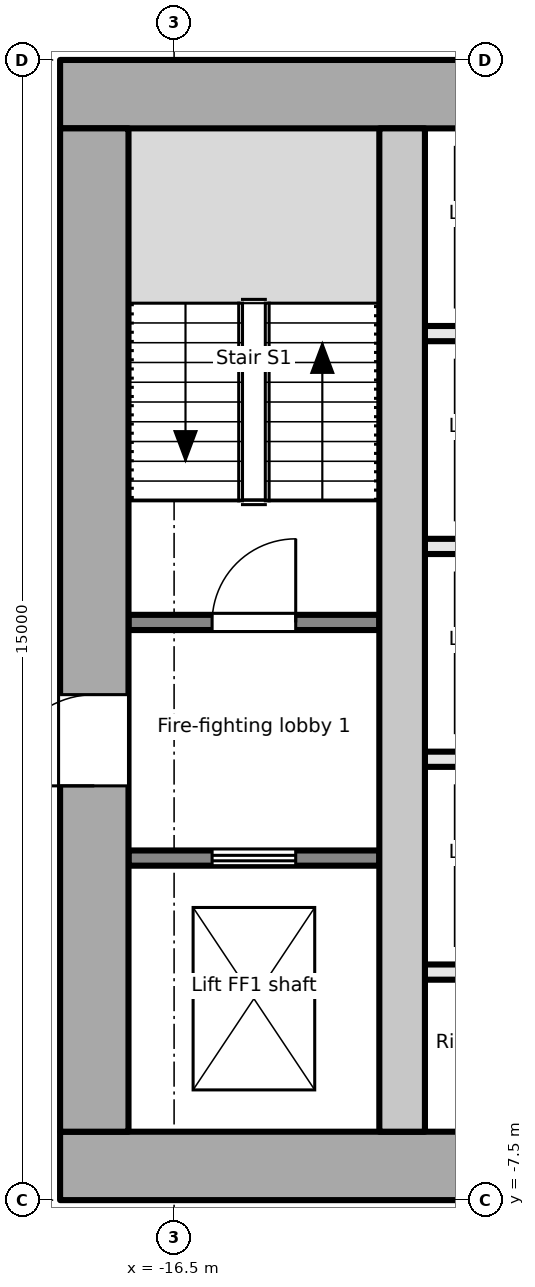
"""IFC4 building model, lengths in metres.
Left out: names, types, materials, properties, quantities, classifications, styles, units other than length and angle.
Written with IfcOpenShell. Run it as: python <this file> out.ifc"""

import sys

from ifc_helpers import new_model, si_unit, direction, frame, frame_2d, origin, place, context, subcontext, project, spatial, rectangle, extrude, element, fill, save


model = new_model("IFC4")
c1 = context("Model", 3, precision=1e-05, world=origin(), true_north=direction((0.0, 1.0)))
c2 = subcontext(c1, "Body", "Model", "MODEL_VIEW")
j1 = project(units=[si_unit("LENGTHUNIT", "METRE"), si_unit("PLANEANGLEUNIT", "RADIAN")], contexts=[c1])
p1 = place(None, origin())
s1 = spatial("IfcSite", under=j1, at=p1, CompositionType="ELEMENT")
p2 = place(p1, origin())
s2 = spatial("IfcBuilding", under=s1, at=p2, CompositionType="ELEMENT")
p3 = place(p2, frame((0.0, 0.0, 52.9)))
s3 = spatial("IfcBuildingStorey", under=s2, at=p3, CompositionType="ELEMENT", Elevation=52.9)
p4 = place(p3, frame((-18.0, -7.05, -0.2), z_axis=(0.0, 0.0, 1.0), x_axis=(1.0, 0.0, 0.0)))
e1 = element("IfcWall", 1, at=p4, inside=s3, PredefinedType="SHEAR", context=c2, shape_type="SweptSolid", body=[
    extrude(rectangle(XDim=36.0, YDim=0.9, at=frame_2d((18.0, 0.0))), origin(), (0.0, 0.0, 1.0), 4.1),
])
p5 = place(p4, frame((7.8, 0.0, 0.2)))
e2 = element("IfcOpeningElement", 2, at=p5, cuts=e1, PredefinedType="OPENING", context=c2, shape_type="SweptSolid", body=[
    extrude(rectangle(XDim=2.4, YDim=2.1, at=frame_2d((1.2, 1.05))), frame((0.0, 0.46, 0.0), z_axis=(0.0, -1.0, 0.0), x_axis=(1.0, 0.0, 0.0)), (0.0, 0.0, 1.0), 0.921),
])
p6 = place(p4, frame((17.4, 0.0, 0.2)))
e3 = element("IfcOpeningElement", 3, at=p6, cuts=e1, PredefinedType="OPENING", context=c2, shape_type="SweptSolid", body=[
    extrude(rectangle(XDim=1.2, YDim=2.1, at=frame_2d((0.6, 1.05))), frame((0.0, 0.46, 0.0), z_axis=(0.0, -1.0, 0.0), x_axis=(1.0, 0.0, 0.0)), (0.0, 0.0, 1.0), 0.921),
])
p7 = place(p4, frame((26.1, 0.0, 0.2)))
e4 = element("IfcOpeningElement", 4, at=p7, cuts=e1, PredefinedType="OPENING", context=c2, shape_type="SweptSolid", body=[
    extrude(rectangle(XDim=2.4, YDim=2.1, at=frame_2d((1.2, 1.05))), frame((0.0, 0.46, 0.0), z_axis=(0.0, -1.0, 0.0), x_axis=(1.0, 0.0, 0.0)), (0.0, 0.0, 1.0), 0.921),
])
p8 = place(p3, frame((-18.0, 7.05, -0.2), z_axis=(0.0, 0.0, 1.0), x_axis=(1.0, 0.0, 0.0)))
e5 = element("IfcWall", 5, at=p8, inside=s3, PredefinedType="SHEAR", context=c2, shape_type="SweptSolid", body=[
    extrude(rectangle(XDim=36.0, YDim=0.9, at=frame_2d((18.0, 0.0))), origin(), (0.0, 0.0, 1.0), 4.1),
])
p9 = place(p3, frame((-17.55, -6.6, -0.2), z_axis=(0.0, 0.0, 1.0), x_axis=(0.0, 1.0, 0.0)))
e6 = element("IfcWall", 6, at=p9, inside=s3, PredefinedType="SHEAR", context=c2, shape_type="SweptSolid", body=[
    extrude(rectangle(XDim=13.2, YDim=0.9, at=frame_2d((6.6, 0.0))), origin(), (0.0, 0.0, 1.0), 4.1),
])
p10 = place(p9, frame((4.55, 0.0, 0.2)))
e7 = element("IfcOpeningElement", 7, at=p10, cuts=e6, PredefinedType="OPENING", context=c2, shape_type="SweptSolid", body=[
    extrude(rectangle(XDim=1.2, YDim=2.1, at=frame_2d((0.6, 1.05))), frame((0.0, 0.46, 0.0), z_axis=(0.0, -1.0, 0.0), x_axis=(1.0, 0.0, 0.0)), (0.0, 0.0, 1.0), 0.921),
])
p11 = place(p3, frame((-13.5, -6.6, -0.2), z_axis=(0.0, 0.0, 1.0), x_axis=(0.0, 1.0, 0.0)))
e8 = element("IfcWall", 8, at=p11, inside=s3, PredefinedType="SHEAR", context=c2, shape_type="SweptSolid", body=[
    extrude(rectangle(XDim=13.2, YDim=0.6, at=frame_2d((6.6, 0.0))), origin(), (0.0, 0.0, 1.0), 4.1),
])
p12 = place(p3, frame((-17.1, -3.0, 0.0), z_axis=(0.0, 0.0, 1.0), x_axis=(1.0, 0.0, 0.0)))
e9 = element("IfcWall", 9, at=p12, inside=s3, PredefinedType="PARTITIONING", context=c2, shape_type="SweptSolid", body=[
    extrude(rectangle(XDim=3.3, YDim=0.2, at=frame_2d((1.65, 0.0))), origin(), (0.0, 0.0, 1.0), 3.9),
])
p13 = place(p12, frame((1.1, 0.0, 0.0)))
e10 = element("IfcOpeningElement", 10, at=p13, cuts=e9, PredefinedType="OPENING", context=c2, shape_type="SweptSolid", body=[
    extrude(rectangle(XDim=1.1, YDim=2.1, at=frame_2d((0.55, 1.05))), frame((0.0, 0.111, 0.0), z_axis=(0.0, -1.0, 0.0), x_axis=(1.0, 0.0, 0.0)), (0.0, 0.0, 1.0), 0.221),
])
p14 = place(p3, frame((-17.1, 0.1, 0.0), z_axis=(0.0, 0.0, 1.0), x_axis=(1.0, 0.0, 0.0)))
e11 = element("IfcWall", 11, at=p14, inside=s3, PredefinedType="PARTITIONING", context=c2, shape_type="SweptSolid", body=[
    extrude(rectangle(XDim=3.3, YDim=0.2, at=frame_2d((1.65, 0.0))), origin(), (0.0, 0.0, 1.0), 3.9),
])
p15 = place(p14, frame((1.1, 0.0, 0.0)))
e12 = element("IfcOpeningElement", 12, at=p15, cuts=e11, PredefinedType="OPENING", context=c2, shape_type="SweptSolid", body=[
    extrude(rectangle(XDim=1.1, YDim=2.1, at=frame_2d((0.55, 1.05))), frame((0.0, 0.111, 0.0), z_axis=(0.0, -1.0, 0.0), x_axis=(1.0, 0.0, 0.0)), (0.0, 0.0, 1.0), 0.221),
])
for number, where, z_axis, x_axis in (
    (13, (-13.2, -1.7, 0.0), (0.0, 0.0, 1.0), (1.0, 0.0, 0.0)),
    (14, (-13.2, 1.1, 0.0), (0.0, 0.0, 1.0), (1.0, 0.0, 0.0)),
    (15, (-13.2, 3.9, 0.0), (0.0, 0.0, 1.0), (1.0, 0.0, 0.0)),
    (16, (-13.2, -4.5, 0.0), (0.0, 0.0, 1.0), (1.0, 0.0, 0.0)),
):
    element("IfcWall", number, at=place(p3, frame(where, z_axis=z_axis, x_axis=x_axis)), inside=s3, PredefinedType="PARTITIONING", context=c2, shape_type="SweptSolid", body=[
        extrude(rectangle(XDim=2.3, YDim=0.2, at=frame_2d((1.15, 0.0))), origin(), (0.0, 0.0, 1.0), 3.9),
    ])
p16 = place(p13, origin())
e17 = element("IfcDoor", 17, at=p16, inside=s3, OperationType="DOUBLE_DOOR_SLIDING", PredefinedType="DOOR", context=c2, shape_type="SweptSolid", body=[
    extrude(rectangle(XDim=1.1, YDim=2.1, at=frame_2d((0.55, 1.05))), frame((0.0, 0.025, 0.0), z_axis=(0.0, -1.0, 0.0), x_axis=(1.0, 0.0, 0.0)), (0.0, 0.0, 1.0), 0.05),
])
fill(e10, e17)
p17 = place(p10, origin())
e18 = element("IfcDoor", 18, at=p17, inside=s3, OperationType="SINGLE_SWING_LEFT", PredefinedType="DOOR", context=c2, shape_type="SweptSolid", body=[
    extrude(rectangle(XDim=1.2, YDim=2.1, at=frame_2d((0.6, 1.05))), frame((0.0, 0.025, 0.0), z_axis=(0.0, -1.0, 0.0), x_axis=(1.0, 0.0, 0.0)), (0.0, 0.0, 1.0), 0.05),
])
fill(e7, e18)
p18 = place(p15, origin())
e19 = element("IfcDoor", 19, at=p18, inside=s3, OperationType="SINGLE_SWING_RIGHT", PredefinedType="DOOR", context=c2, shape_type="SweptSolid", body=[
    extrude(rectangle(XDim=1.1, YDim=2.1, at=frame_2d((0.55, 1.05))), frame((0.0, 0.025, 0.0), z_axis=(0.0, -1.0, 0.0), x_axis=(1.0, 0.0, 0.0)), (0.0, 0.0, 1.0), 0.05),
])
fill(e12, e19)
save(model, sys.argv[1])
